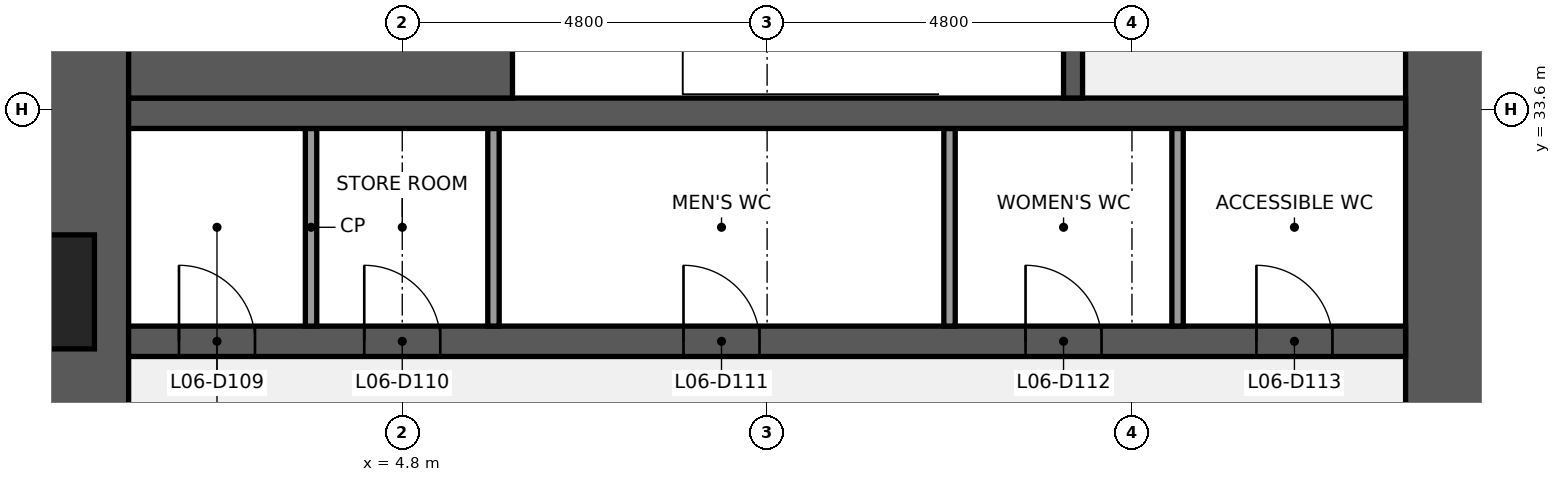
"""IFC4 building model, lengths in metres.
Left out: names, types, materials, properties, quantities, classifications, styles, units other than length and angle.
Written with IfcOpenShell. Run it as: python <this file> out.ifc"""

import sys

from ifc_helpers import new_model, si_unit, direction, frame, frame_2d, origin, place, context, subcontext, project, spatial, rectangle, extrude, element, fill, save


model = new_model("IFC4")
c1 = context("Model", 3, precision=1e-05, world=origin(), true_north=direction((0.0, 1.0)))
c2 = subcontext(c1, "Body", "Model", "MODEL_VIEW")
j1 = project(units=[si_unit("LENGTHUNIT", "METRE"), si_unit("PLANEANGLEUNIT", "RADIAN")], contexts=[c1])
p1 = place(None, origin())
s1 = spatial("IfcSite", under=j1, at=p1, CompositionType="ELEMENT")
p2 = place(p1, origin())
s2 = spatial("IfcBuilding", under=s1, at=p2, CompositionType="ELEMENT")
p3 = place(p2, frame((0.0, 0.0, 34.6)))
s3 = spatial("IfcBuildingStorey", under=s2, at=p3, CompositionType="ELEMENT", Elevation=34.6)
p4 = place(p3, frame((0.6, 9.6, 0.0), z_axis=(0.0, 0.0, 1.0), x_axis=(0.0, 1.0, 0.0)))
e1 = element("IfcWall", 1, at=p4, inside=s3, PredefinedType="SHEAR", context=c2, shape_type="SweptSolid", body=[
    extrude(rectangle(XDim=28.8, YDim=1.2, at=frame_2d((14.4, 0.0))), origin(), (0.0, 0.0, 1.0), 4.24),
])
p5 = place(p4, frame((8.85, 0.0, 0.9)))
e2 = element("IfcOpeningElement", 2, at=p5, cuts=e1, PredefinedType="OPENING", context=c2, shape_type="SweptSolid", body=[
    extrude(rectangle(XDim=1.5, YDim=1.5, at=frame_2d((0.75, 0.75))), frame((0.0, 0.61, 0.0), z_axis=(0.0, -1.0, 0.0), x_axis=(1.0, 0.0, 0.0)), (0.0, 0.0, 1.0), 1.22),
])
p6 = place(p4, frame((18.45, 0.0, 0.9)))
e3 = element("IfcOpeningElement", 3, at=p6, cuts=e1, PredefinedType="OPENING", context=c2, shape_type="SweptSolid", body=[
    extrude(rectangle(XDim=1.5, YDim=1.5, at=frame_2d((0.75, 0.75))), frame((0.0, 0.61, 0.0), z_axis=(0.0, -1.0, 0.0), x_axis=(1.0, 0.0, 0.0)), (0.0, 0.0, 1.0), 1.22),
])
p7 = place(p3, frame((18.6, 38.4, 0.0), z_axis=(0.0, 0.0, 1.0), x_axis=(0.0, -1.0, 0.0)))
e4 = element("IfcWall", 4, at=p7, inside=s3, PredefinedType="SHEAR", context=c2, shape_type="SweptSolid", body=[
    extrude(rectangle(XDim=28.8, YDim=1.2, at=frame_2d((14.4, 0.0))), origin(), (0.0, 0.0, 1.0), 4.24),
])
p8 = place(p7, frame((18.3, 0.0, 0.0)))
e5 = element("IfcOpeningElement", 5, at=p8, cuts=e4, PredefinedType="OPENING", context=c2, shape_type="SweptSolid", body=[
    extrude(rectangle(XDim=1.8, YDim=2.1, at=frame_2d((0.9, 1.05))), frame((0.0, 0.61, 0.0), z_axis=(0.0, -1.0, 0.0), x_axis=(1.0, 0.0, 0.0)), (0.0, 0.0, 1.0), 1.22),
])
p9 = place(p7, frame((8.7, 0.0, 0.0)))
e6 = element("IfcOpeningElement", 6, at=p9, cuts=e4, PredefinedType="OPENING", context=c2, shape_type="SweptSolid", body=[
    extrude(rectangle(XDim=1.8, YDim=2.1, at=frame_2d((0.9, 1.05))), frame((0.0, 0.61, 0.0), z_axis=(0.0, -1.0, 0.0), x_axis=(1.0, 0.0, 0.0)), (0.0, 0.0, 1.0), 1.22),
])
p10 = place(p3, frame((1.2, 30.55, 0.0), z_axis=(0.0, 0.0, 1.0), x_axis=(1.0, 0.0, 0.0)))
e7 = element("IfcWall", 7, at=p10, inside=s3, PredefinedType="SHEAR", context=c2, shape_type="SweptSolid", body=[
    extrude(rectangle(XDim=16.8, YDim=0.4, at=frame_2d((8.4, 0.0))), origin(), (0.0, 0.0, 1.0), 4.24),
])
p11 = place(p10, frame((0.663, 0.0, 0.0)))
e8 = element("IfcOpeningElement", 8, at=p11, cuts=e7, PredefinedType="OPENING", context=c2, shape_type="SweptSolid", body=[
    extrude(rectangle(XDim=1.0, YDim=2.1, at=frame_2d((0.5, 1.05))), frame((0.0, 0.21, 0.0), z_axis=(0.0, -1.0, 0.0), x_axis=(1.0, 0.0, 0.0)), (0.0, 0.0, 1.0), 0.42),
])
p12 = place(p10, frame((3.1, 0.0, 0.0)))
e9 = element("IfcOpeningElement", 9, at=p12, cuts=e7, PredefinedType="OPENING", context=c2, shape_type="SweptSolid", body=[
    extrude(rectangle(XDim=1.0, YDim=2.1, at=frame_2d((0.5, 1.05))), frame((0.0, 0.21, 0.0), z_axis=(0.0, -1.0, 0.0), x_axis=(1.0, 0.0, 0.0)), (0.0, 0.0, 1.0), 0.42),
])
p13 = place(p10, frame((7.3, 0.0, 0.0)))
e10 = element("IfcOpeningElement", 10, at=p13, cuts=e7, PredefinedType="OPENING", context=c2, shape_type="SweptSolid", body=[
    extrude(rectangle(XDim=1.0, YDim=2.1, at=frame_2d((0.5, 1.05))), frame((0.0, 0.21, 0.0), z_axis=(0.0, -1.0, 0.0), x_axis=(1.0, 0.0, 0.0)), (0.0, 0.0, 1.0), 0.42),
])
p14 = place(p10, frame((11.8, 0.0, 0.0)))
e11 = element("IfcOpeningElement", 11, at=p14, cuts=e7, PredefinedType="OPENING", context=c2, shape_type="SweptSolid", body=[
    extrude(rectangle(XDim=1.0, YDim=2.1, at=frame_2d((0.5, 1.05))), frame((0.0, 0.21, 0.0), z_axis=(0.0, -1.0, 0.0), x_axis=(1.0, 0.0, 0.0)), (0.0, 0.0, 1.0), 0.42),
])
p15 = place(p10, frame((14.837, 0.0, 0.0)))
e12 = element("IfcOpeningElement", 12, at=p15, cuts=e7, PredefinedType="OPENING", context=c2, shape_type="SweptSolid", body=[
    extrude(rectangle(XDim=1.0, YDim=2.1, at=frame_2d((0.5, 1.05))), frame((0.0, 0.21, 0.0), z_axis=(0.0, -1.0, 0.0), x_axis=(1.0, 0.0, 0.0)), (0.0, 0.0, 1.0), 0.42),
])
for number, where, z_axis, x_axis in (
    (13, (3.6, 30.75, 0.0), (0.0, 0.0, 1.0), (0.0, 1.0, 0.0)),
    (14, (6.0, 30.75, 0.0), (0.0, 0.0, 1.0), (0.0, 1.0, 0.0)),
    (15, (12.0, 30.75, 0.0), (0.0, 0.0, 1.0), (0.0, 1.0, 0.0)),
    (16, (15.0, 30.75, 0.0), (0.0, 0.0, 1.0), (0.0, 1.0, 0.0)),
):
    element("IfcWall", number, at=place(p3, frame(where, z_axis=z_axis, x_axis=x_axis)), inside=s3, PredefinedType="PARTITIONING", context=c2, shape_type="SweptSolid", body=[
        extrude(rectangle(XDim=2.6, YDim=0.15, at=frame_2d((1.3, 0.0))), origin(), (0.0, 0.0, 1.0), 4.24),
    ])
p16 = place(p3, frame((1.2, 33.55, 0.0), z_axis=(0.0, 0.0, 1.0), x_axis=(1.0, 0.0, 0.0)))
e17 = element("IfcWall", 17, at=p16, inside=s3, PredefinedType="SHEAR", context=c2, shape_type="SweptSolid", body=[
    extrude(rectangle(XDim=16.8, YDim=0.4, at=frame_2d((8.4, 0.0))), origin(), (0.0, 0.0, 1.0), 4.24),
])
p17 = place(p3, frame((1.2, 35.475, 0.0), z_axis=(0.0, 0.0, 1.0), x_axis=(1.0, 0.0, 0.0)))
e18 = element("IfcWall", 18, at=p17, inside=s3, PredefinedType="SHEAR", context=c2, shape_type="SweptSolid", body=[
    extrude(rectangle(XDim=5.05, YDim=3.45, at=frame_2d((2.525, 0.0))), origin(), (0.0, 0.0, 1.0), 4.24),
])
p18 = place(p3, frame((13.625, 33.75, 0.0), z_axis=(0.0, 0.0, 1.0), x_axis=(0.0, 1.0, 0.0)))
e19 = element("IfcWall", 19, at=p18, inside=s3, PredefinedType="SHEAR", context=c2, shape_type="SweptSolid", body=[
    extrude(rectangle(XDim=3.45, YDim=0.25, at=frame_2d((1.725, 0.0))), origin(), (0.0, 0.0, 1.0), 4.24),
])
p19 = place(p18, frame((1.175, 0.0, 0.0)))
e20 = element("IfcOpeningElement", 20, at=p19, cuts=e19, PredefinedType="OPENING", context=c2, shape_type="SweptSolid", body=[
    extrude(rectangle(XDim=1.1, YDim=2.1, at=frame_2d((0.55, 1.05))), frame((0.0, 0.135, 0.0), z_axis=(0.0, -1.0, 0.0), x_axis=(1.0, 0.0, 0.0)), (0.0, 0.0, 1.0), 0.27),
])
p20 = place(p11, origin())
e21 = element("IfcDoor", 21, at=p20, inside=s3, OperationType="SINGLE_SWING_LEFT", PredefinedType="DOOR", context=c2, shape_type="SweptSolid", body=[
    extrude(rectangle(XDim=1.0, YDim=2.1, at=frame_2d((0.5, 1.05))), frame((0.0, 0.025, 0.0), z_axis=(0.0, -1.0, 0.0), x_axis=(1.0, 0.0, 0.0)), (0.0, 0.0, 1.0), 0.05),
])
fill(e8, e21)
p21 = place(p12, origin())
e22 = element("IfcDoor", 22, at=p21, inside=s3, OperationType="SINGLE_SWING_LEFT", PredefinedType="DOOR", context=c2, shape_type="SweptSolid", body=[
    extrude(rectangle(XDim=1.0, YDim=2.1, at=frame_2d((0.5, 1.05))), frame((0.0, 0.025, 0.0), z_axis=(0.0, -1.0, 0.0), x_axis=(1.0, 0.0, 0.0)), (0.0, 0.0, 1.0), 0.05),
])
fill(e9, e22)
p22 = place(p13, origin())
e23 = element("IfcDoor", 23, at=p22, inside=s3, OperationType="SINGLE_SWING_LEFT", PredefinedType="DOOR", context=c2, shape_type="SweptSolid", body=[
    extrude(rectangle(XDim=1.0, YDim=2.1, at=frame_2d((0.5, 1.05))), frame((0.0, 0.025, 0.0), z_axis=(0.0, -1.0, 0.0), x_axis=(1.0, 0.0, 0.0)), (0.0, 0.0, 1.0), 0.05),
])
fill(e10, e23)
p23 = place(p14, origin())
e24 = element("IfcDoor", 24, at=p23, inside=s3, OperationType="SINGLE_SWING_LEFT", PredefinedType="DOOR", context=c2, shape_type="SweptSolid", body=[
    extrude(rectangle(XDim=1.0, YDim=2.1, at=frame_2d((0.5, 1.05))), frame((0.0, 0.025, 0.0), z_axis=(0.0, -1.0, 0.0), x_axis=(1.0, 0.0, 0.0)), (0.0, 0.0, 1.0), 0.05),
])
fill(e11, e24)
p24 = place(p15, origin())
e25 = element("IfcDoor", 25, at=p24, inside=s3, OperationType="SINGLE_SWING_LEFT", PredefinedType="DOOR", context=c2, shape_type="SweptSolid", body=[
    extrude(rectangle(XDim=1.0, YDim=2.1, at=frame_2d((0.5, 1.05))), frame((0.0, 0.025, 0.0), z_axis=(0.0, -1.0, 0.0), x_axis=(1.0, 0.0, 0.0)), (0.0, 0.0, 1.0), 0.05),
])
fill(e12, e25)
save(model, sys.argv[1])
